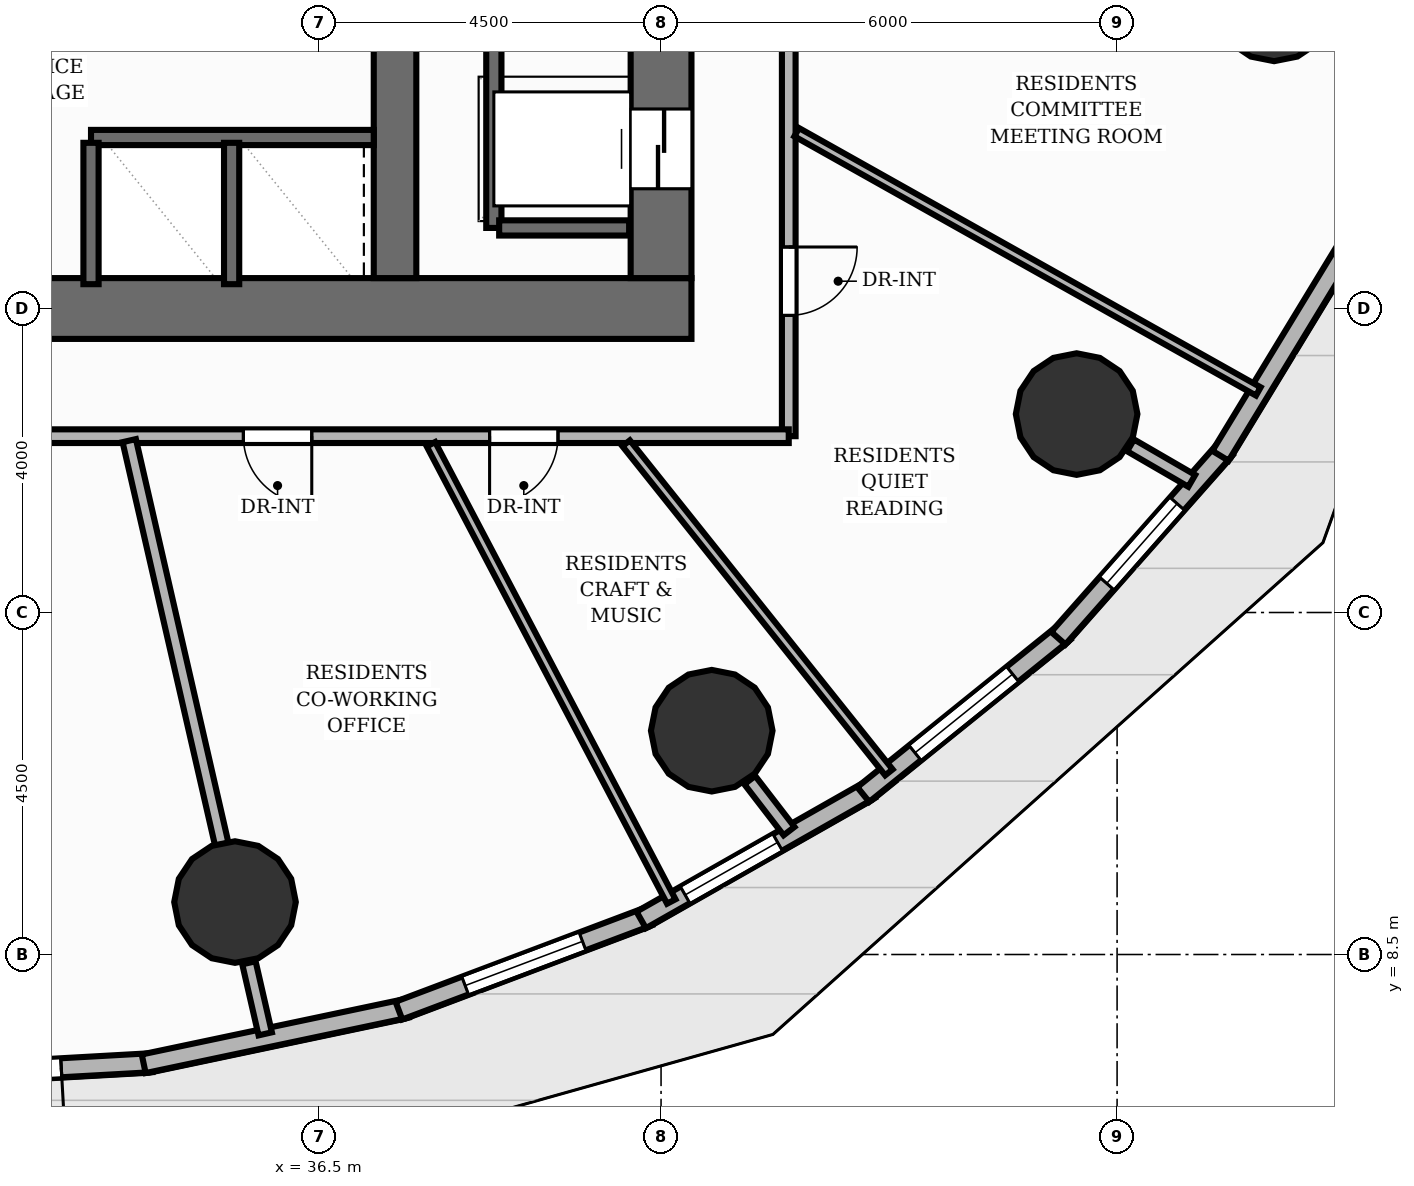
"""IFC4 building model, lengths in metres.
Left out: names, types, materials, properties, quantities, classifications, styles, units other than length and angle.
Written with IfcOpenShell. Run it as: python <this file> out.ifc"""

import sys

from ifc_helpers import new_model, si_unit, direction, frame, frame_2d, origin, origin_2d, place, context, subcontext, project, spatial, rectangle, circle, extrude, element, fill, save


model = new_model("IFC4")
c1 = context("Model", 3, precision=1e-05, world=origin(), true_north=direction((0.0, 1.0)))
c2 = subcontext(c1, "Body", "Model", "MODEL_VIEW")
j1 = project(units=[si_unit("LENGTHUNIT", "METRE"), si_unit("PLANEANGLEUNIT", "RADIAN")], contexts=[c1])
p1 = place(None, origin())
s1 = spatial("IfcSite", under=j1, at=p1, CompositionType="ELEMENT")
p2 = place(p1, origin())
s2 = spatial("IfcBuilding", under=s1, at=p2, CompositionType="ELEMENT")
p3 = place(p2, frame((0.0, 0.0, 34.4)))
s3 = spatial("IfcBuildingStorey", under=s2, at=p3, CompositionType="ELEMENT", Elevation=34.4)
p4 = place(p3, frame((22.6, 17.0, 0.0), z_axis=(0.0, 0.0, 1.0), x_axis=(1.0, 0.0, 0.0)))
e1 = element("IfcWall", 1, at=p4, inside=s3, PredefinedType="SHEAR", context=c2, shape_type="SweptSolid", body=[
    extrude(rectangle(XDim=18.8, YDim=0.8, at=frame_2d((9.4, 0.0))), origin(), (0.0, 0.0, 1.0), 3.2),
])
p5 = place(p4, frame((5.9, 0.0, 0.0)))
e2 = element("IfcOpeningElement", 2, at=p5, cuts=e1, PredefinedType="OPENING", context=c2, shape_type="SweptSolid", body=[
    extrude(rectangle(XDim=1.1, YDim=2.15, at=frame_2d((0.55, 1.075))), frame((0.0, 0.41, 0.0), z_axis=(0.0, -1.0, 0.0), x_axis=(1.0, 0.0, 0.0)), (0.0, 0.0, 1.0), 0.82),
])
p6 = place(p4, frame((9.45, 0.0, 0.0)))
e3 = element("IfcOpeningElement", 3, at=p6, cuts=e1, PredefinedType="OPENING", context=c2, shape_type="SweptSolid", body=[
    extrude(rectangle(XDim=0.9, YDim=2.1, at=frame_2d((0.45, 1.05))), frame((0.0, 0.41, 0.0), z_axis=(0.0, -1.0, 0.0), x_axis=(1.0, 0.0, 0.0)), (0.0, 0.0, 1.0), 0.82),
])
p7 = place(p3, frame((41.0, 17.4, 0.0), z_axis=(0.0, 0.0, 1.0), x_axis=(0.0, 1.0, 0.0)))
e4 = element("IfcWall", 4, at=p7, inside=s3, PredefinedType="SHEAR", context=c2, shape_type="SweptSolid", body=[
    extrude(rectangle(XDim=13.2, YDim=0.8, at=frame_2d((6.6, 0.0))), origin(), (0.0, 0.0, 1.0), 3.2),
])
p8 = place(p7, frame((1.175, 0.0, 0.0)))
e5 = element("IfcOpeningElement", 5, at=p8, cuts=e4, PredefinedType="OPENING", context=c2, shape_type="SweptSolid", body=[
    extrude(rectangle(XDim=1.05, YDim=2.15, at=frame_2d((0.525, 1.075))), frame((0.0, 0.41, 0.0), z_axis=(0.0, -1.0, 0.0), x_axis=(1.0, 0.0, 0.0)), (0.0, 0.0, 1.0), 0.82),
])
p9 = place(p7, frame((4.425, 0.0, 0.0)))
e6 = element("IfcOpeningElement", 6, at=p9, cuts=e4, PredefinedType="OPENING", context=c2, shape_type="SweptSolid", body=[
    extrude(rectangle(XDim=1.05, YDim=2.15, at=frame_2d((0.525, 1.075))), frame((0.0, 0.41, 0.0), z_axis=(0.0, -1.0, 0.0), x_axis=(1.0, 0.0, 0.0)), (0.0, 0.0, 1.0), 0.82),
])
p10 = place(p7, frame((7.725, 0.0, 0.0)))
e7 = element("IfcOpeningElement", 7, at=p10, cuts=e4, PredefinedType="OPENING", context=c2, shape_type="SweptSolid", body=[
    extrude(rectangle(XDim=1.05, YDim=2.15, at=frame_2d((0.525, 1.075))), frame((0.0, 0.41, 0.0), z_axis=(0.0, -1.0, 0.0), x_axis=(1.0, 0.0, 0.0)), (0.0, 0.0, 1.0), 0.82),
])
p11 = place(p7, frame((10.975, 0.0, 0.0)))
e8 = element("IfcOpeningElement", 8, at=p11, cuts=e4, PredefinedType="OPENING", context=c2, shape_type="SweptSolid", body=[
    extrude(rectangle(XDim=1.05, YDim=2.15, at=frame_2d((0.525, 1.075))), frame((0.0, 0.41, 0.0), z_axis=(0.0, -1.0, 0.0), x_axis=(1.0, 0.0, 0.0)), (0.0, 0.0, 1.0), 0.82),
])
p12 = place(p3, frame((37.5, 17.4, 0.0), z_axis=(0.0, 0.0, 1.0), x_axis=(0.0, 1.0, 0.0)))
e9 = element("IfcWall", 9, at=p12, inside=s3, PredefinedType="SHEAR", context=c2, shape_type="SweptSolid", body=[
    extrude(rectangle(XDim=13.2, YDim=0.56, at=frame_2d((6.6, 0.0))), origin(), (0.0, 0.0, 1.0), 3.2),
])
for number, where, z_axis, x_axis in (
    (10, (35.395, 9.19, 0.0), (0.0, 0.0, 1.0), (1.0, 0.0, 0.0)),
    (11, (41.667, 11.445, 0.0), (0.0, 0.0, 1.0), (1.0, 0.0, 0.0)),
    (12, (46.468, 15.611, 0.0), (0.0, 0.0, 1.0), (1.0, 0.0, 0.0)),
    (13, (49.066, 21.054, 0.0), (0.0, 0.0, 1.0), (1.0, 0.0, 0.0)),
):
    element("IfcColumn", number, at=place(p3, frame(where, z_axis=z_axis, x_axis=x_axis)), inside=s3, PredefinedType="COLUMN", context=c2, shape_type="SweptSolid", body=[
        extrude(circle(Radius=0.8, at=origin_2d()), origin(), (0.0, 0.0, 1.0), 3.2),
    ])
p13 = place(p3, frame((34.301, 7.077, 0.0), z_axis=(0.0, 0.0, 1.0), x_axis=(-0.998425121055, -0.056100602904, 0.0)))
e14 = element("IfcWall", 14, at=p13, inside=s3, PredefinedType="SOLIDWALL", context=c2, shape_type="SweptSolid", body=[
    extrude(rectangle(XDim=3.538, YDim=0.25, at=frame_2d((1.769, 0.0))), origin(), (0.0, 0.0, 1.0), 2.96),
])
p14 = place(p13, frame((1.194, 0.0, 0.0)))
e15 = element("IfcOpeningElement", 15, at=p14, cuts=e14, PredefinedType="OPENING", context=c2, shape_type="SweptSolid", body=[
    extrude(rectangle(XDim=1.15, YDim=2.2, at=frame_2d((0.575, 1.1))), frame((0.0, 0.135, 0.0), z_axis=(0.0, -1.0, 0.0), x_axis=(1.0, 0.0, 0.0)), (0.0, 0.0, 1.0), 0.27),
])
p15 = place(p3, frame((37.655, 7.792, 0.0), z_axis=(0.0, 0.0, 1.0), x_axis=(-0.978483842038, -0.206323461756, 0.0)))
e16 = element("IfcWall", 16, at=p15, inside=s3, PredefinedType="SOLIDWALL", context=c2, shape_type="SweptSolid", body=[
    extrude(rectangle(XDim=3.538, YDim=0.25, at=frame_2d((1.769, 0.0))), origin(), (0.0, 0.0, 1.0), 2.96),
])
p16 = place(p3, frame((40.838, 9.001, 0.0), z_axis=(0.0, 0.0, 1.0), x_axis=(-0.935679231508, -0.352851775857, 0.0)))
e17 = element("IfcWall", 17, at=p16, inside=s3, PredefinedType="SOLIDWALL", context=c2, shape_type="SweptSolid", body=[
    extrude(rectangle(XDim=3.513, YDim=0.25, at=frame_2d((1.756, 0.0))), origin(), (0.0, 0.0, 1.0), 2.96),
])
p17 = place(p16, frame((0.931, 0.0, 0.85)))
e18 = element("IfcOpeningElement", 18, at=p17, cuts=e17, PredefinedType="OPENING", context=c2, shape_type="SweptSolid", body=[
    extrude(rectangle(XDim=1.65, YDim=1.55, at=frame_2d((0.825, 0.775))), frame((0.0, 0.135, 0.0), z_axis=(0.0, -1.0, 0.0), x_axis=(1.0, 0.0, 0.0)), (0.0, 0.0, 1.0), 0.27),
])
p18 = place(p3, frame((43.751, 10.667, 0.0), z_axis=(0.0, 0.0, 1.0), x_axis=(-0.869389832426, -0.494126825091, 0.0)))
e19 = element("IfcWall", 19, at=p18, inside=s3, PredefinedType="SOLIDWALL", context=c2, shape_type="SweptSolid", body=[
    extrude(rectangle(XDim=3.465, YDim=0.25, at=frame_2d((1.732, 0.0))), origin(), (0.0, 0.0, 1.0), 2.96),
])
p19 = place(p18, frame((1.4, 0.0, 0.85)))
e20 = element("IfcOpeningElement", 20, at=p19, cuts=e19, PredefinedType="OPENING", context=c2, shape_type="SweptSolid", body=[
    extrude(rectangle(XDim=1.4, YDim=1.29, at=frame_2d((0.7, 0.645))), frame((0.0, 0.135, 0.0), z_axis=(0.0, -1.0, 0.0), x_axis=(1.0, 0.0, 0.0)), (0.0, 0.0, 1.0), 0.27),
])
p20 = place(p3, frame((46.307, 12.739, 0.0), z_axis=(0.0, 0.0, 1.0), x_axis=(-0.778586232895, -0.627537630701, 0.0)))
e21 = element("IfcWall", 21, at=p20, inside=s3, PredefinedType="SOLIDWALL", context=c2, shape_type="SweptSolid", body=[
    extrude(rectangle(XDim=3.399, YDim=0.25, at=frame_2d((1.7, 0.0))), origin(), (0.0, 0.0, 1.0), 2.96),
])
p21 = place(p20, frame((0.875, 0.0, 0.85)))
e22 = element("IfcOpeningElement", 22, at=p21, cuts=e21, PredefinedType="OPENING", context=c2, shape_type="SweptSolid", body=[
    extrude(rectangle(XDim=1.65, YDim=1.55, at=frame_2d((0.825, 0.775))), frame((0.0, 0.135, 0.0), z_axis=(0.0, -1.0, 0.0), x_axis=(1.0, 0.0, 0.0)), (0.0, 0.0, 1.0), 0.27),
])
p22 = place(p3, frame((48.427, 15.152, 0.0), z_axis=(0.0, 0.0, 1.0), x_axis=(-0.662112398544, -0.749404544751, 0.0)))
e23 = element("IfcWall", 23, at=p22, inside=s3, PredefinedType="SOLIDWALL", context=c2, shape_type="SweptSolid", body=[
    extrude(rectangle(XDim=3.323, YDim=0.25, at=frame_2d((1.661, 0.0))), origin(), (0.0, 0.0, 1.0), 2.96),
])
p23 = place(p22, frame((0.961, 0.0, 0.85)))
e24 = element("IfcOpeningElement", 24, at=p23, cuts=e23, PredefinedType="OPENING", context=c2, shape_type="SweptSolid", body=[
    extrude(rectangle(XDim=1.4, YDim=1.55, at=frame_2d((0.7, 0.775))), frame((0.0, 0.135, 0.0), z_axis=(0.0, -1.0, 0.0), x_axis=(1.0, 0.0, 0.0)), (0.0, 0.0, 1.0), 0.27),
])
p24 = place(p3, frame((50.046, 17.834, 0.0), z_axis=(0.0, 0.0, 1.0), x_axis=(-0.519753566346, -0.854316235519, 0.0)))
e25 = element("IfcWall", 25, at=p24, inside=s3, PredefinedType="SOLIDWALL", context=c2, shape_type="SweptSolid", body=[
    extrude(rectangle(XDim=3.244, YDim=0.25, at=frame_2d((1.622, 0.0))), origin(), (0.0, 0.0, 1.0), 2.96),
])
p25 = place(p3, frame((38.8, 18.06, 0.0), z_axis=(0.0, 0.0, 1.0), x_axis=(0.0, 1.0, 0.0)))
e26 = element("IfcWall", 26, at=p25, inside=s3, PredefinedType="SHEAR", context=c2, shape_type="SweptSolid", body=[
    extrude(rectangle(XDim=11.88, YDim=0.2, at=frame_2d((5.94, 0.0))), origin(), (0.0, 0.0, 1.0), 3.2),
])
p26 = place(p3, frame((38.87, 18.06, 0.0), z_axis=(0.0, 0.0, 1.0), x_axis=(1.0, 0.0, 0.0)))
e27 = element("IfcWall", 27, at=p26, inside=s3, PredefinedType="SHEAR", context=c2, shape_type="SweptSolid", body=[
    extrude(rectangle(XDim=1.71, YDim=0.2, at=frame_2d((0.855, 0.0))), origin(), (0.0, 0.0, 1.0), 3.2),
])
p27 = place(p3, frame((33.5, 19.25, 0.0), z_axis=(0.0, 0.0, 1.0), x_axis=(1.0, 0.0, 0.0)))
e28 = element("IfcWall", 28, at=p27, inside=s3, PredefinedType="SHEAR", context=c2, shape_type="SweptSolid", body=[
    extrude(rectangle(XDim=3.72, YDim=0.2, at=frame_2d((1.86, 0.0))), origin(), (0.0, 0.0, 1.0), 3.2),
])
for number, where, z_axis, x_axis in (
    (29, (33.5, 17.32, 0.0), (0.0, 0.0, 1.0), (0.0, 1.0, 0.0)),
    (30, (35.35, 17.32, 0.0), (0.0, 0.0, 1.0), (0.0, 1.0, 0.0)),
):
    element("IfcWall", number, at=place(p3, frame(where, z_axis=z_axis, x_axis=x_axis)), inside=s3, PredefinedType="SHEAR", context=c2, shape_type="SweptSolid", body=[
        extrude(rectangle(XDim=1.86, YDim=0.2, at=frame_2d((0.93, 0.0))), origin(), (0.0, 0.0, 1.0), 3.2),
    ])
p28 = place(p3, frame((35.578, 8.391, 0.0), z_axis=(0.0, 0.0, 1.0), x_axis=(0.223204870581, -0.974771555673, 0.0)))
e31 = element("IfcWall", 31, at=p28, inside=s3, PredefinedType="PARTITIONING", context=c2, shape_type="SweptSolid", body=[
    extrude(rectangle(XDim=0.959, YDim=0.18, at=frame_2d((0.479, 0.0))), origin(), (0.0, 0.0, 1.0), 2.178),
])
p29 = place(p3, frame((42.167, 10.795, 0.0), z_axis=(0.0, 0.0, 1.0), x_axis=(0.609822176225, -0.792538272504, 0.0)))
e32 = element("IfcWall", 32, at=p29, inside=s3, PredefinedType="PARTITIONING", context=c2, shape_type="SweptSolid", body=[
    extrude(rectangle(XDim=0.847, YDim=0.18, at=frame_2d((0.424, 0.0))), origin(), (0.0, 0.0, 1.0), 2.178),
])
p30 = place(p3, frame((47.177, 15.2, 0.0), z_axis=(0.0, 0.0, 1.0), x_axis=(0.864965183009, -0.501831876411, 0.0)))
e33 = element("IfcWall", 33, at=p30, inside=s3, PredefinedType="PARTITIONING", context=c2, shape_type="SweptSolid", body=[
    extrude(rectangle(XDim=0.931, YDim=0.18, at=frame_2d((0.466, 0.0))), origin(), (0.0, 0.0, 1.0), 2.178),
])
p31 = place(p3, frame((42.68, 22.656, 0.0), z_axis=(0.0, 0.0, 1.0), x_axis=(0.0, -1.0, 0.0)))
e34 = element("IfcWall", 34, at=p31, inside=s3, PredefinedType="PARTITIONING", context=c2, shape_type="SweptSolid", body=[
    extrude(rectangle(XDim=7.335, YDim=0.18, at=frame_2d((3.668, 0.0))), origin(), (0.0, 0.0, 1.0), 2.955),
])
p32 = place(p31, frame((1.2, 0.0, 0.0)))
e35 = element("IfcOpeningElement", 35, at=p32, cuts=e34, PredefinedType="OPENING", context=c2, shape_type="SweptSolid", body=[
    extrude(rectangle(XDim=0.9, YDim=2.1, at=frame_2d((0.45, 1.05))), frame((0.0, 0.1, 0.0), z_axis=(0.0, -1.0, 0.0), x_axis=(1.0, 0.0, 0.0)), (0.0, 0.0, 1.0), 0.2),
])
p33 = place(p31, frame((4.846, 0.0, 0.0)))
e36 = element("IfcOpeningElement", 36, at=p33, cuts=e34, PredefinedType="OPENING", context=c2, shape_type="SweptSolid", body=[
    extrude(rectangle(XDim=0.9, YDim=2.1, at=frame_2d((0.45, 1.05))), frame((0.0, 0.1, 0.0), z_axis=(0.0, -1.0, 0.0), x_axis=(1.0, 0.0, 0.0)), (0.0, 0.0, 1.0), 0.2),
])
p34 = place(p3, frame((42.68, 15.32, 0.0), z_axis=(0.0, 0.0, 1.0), x_axis=(-1.0, 0.0, 0.0)))
e37 = element("IfcWall", 37, at=p34, inside=s3, PredefinedType="PARTITIONING", context=c2, shape_type="SweptSolid", body=[
    extrude(rectangle(XDim=21.36, YDim=0.18, at=frame_2d((10.68, 0.0))), origin(), (0.0, 0.0, 1.0), 2.955),
])
p35 = place(p34, frame((3.036, 0.0, 0.0)))
e38 = element("IfcOpeningElement", 38, at=p35, cuts=e37, PredefinedType="OPENING", context=c2, shape_type="SweptSolid", body=[
    extrude(rectangle(XDim=0.9, YDim=2.1, at=frame_2d((0.45, 1.05))), frame((0.0, 0.1, 0.0), z_axis=(0.0, -1.0, 0.0), x_axis=(1.0, 0.0, 0.0)), (0.0, 0.0, 1.0), 0.2),
])
p36 = place(p34, frame((6.275, 0.0, 0.0)))
e39 = element("IfcOpeningElement", 39, at=p36, cuts=e37, PredefinedType="OPENING", context=c2, shape_type="SweptSolid", body=[
    extrude(rectangle(XDim=0.9, YDim=2.1, at=frame_2d((0.45, 1.05))), frame((0.0, 0.1, 0.0), z_axis=(0.0, -1.0, 0.0), x_axis=(1.0, 0.0, 0.0)), (0.0, 0.0, 1.0), 0.2),
])
p37 = place(p34, frame((14.49, 0.0, 0.0)))
e40 = element("IfcOpeningElement", 40, at=p37, cuts=e37, PredefinedType="OPENING", context=c2, shape_type="SweptSolid", body=[
    extrude(rectangle(XDim=1.05, YDim=2.15, at=frame_2d((0.525, 1.075))), frame((0.0, 0.1, 0.0), z_axis=(0.0, -1.0, 0.0), x_axis=(1.0, 0.0, 0.0)), (0.0, 0.0, 1.0), 0.2),
])
p38 = place(p3, frame((48.858, 15.909, 0.0), z_axis=(0.0, 0.0, 1.0), x_axis=(-0.871931019114, 0.489628734764, 0.0)))
e41 = element("IfcWall", 41, at=p38, inside=s3, PredefinedType="PARTITIONING", context=c2, shape_type="SweptSolid", body=[
    extrude(rectangle(XDim=6.965, YDim=0.125, at=frame_2d((3.483, 0.0))), origin(), (0.0, 0.0, 1.0), 2.642),
])
p39 = place(p3, frame((43.998, 10.897, 0.0), z_axis=(0.0, 0.0, 1.0), x_axis=(-0.623937025269, 0.781474624347, 0.0)))
e42 = element("IfcWall", 42, at=p39, inside=s3, PredefinedType="PARTITIONING", context=c2, shape_type="SweptSolid", body=[
    extrude(rectangle(XDim=5.54, YDim=0.125, at=frame_2d((2.77, 0.0))), origin(), (0.0, 0.0, 1.0), 2.955),
])
p40 = place(p3, frame((41.135, 9.197, 0.0), z_axis=(0.0, 0.0, 1.0), x_axis=(-0.465197105493, 0.885207124373, 0.0)))
e43 = element("IfcWall", 43, at=p40, inside=s3, PredefinedType="PARTITIONING", context=c2, shape_type="SweptSolid", body=[
    extrude(rectangle(XDim=6.797, YDim=0.125, at=frame_2d((3.398, 0.0))), origin(), (0.0, 0.0, 1.0), 2.955),
])
p41 = place(p3, frame((35.221, 9.948, 0.0), z_axis=(0.0, 0.0, 1.0), x_axis=(-0.223436436687, 0.974718502318, 0.0)))
e44 = element("IfcWall", 44, at=p41, inside=s3, PredefinedType="PARTITIONING", context=c2, shape_type="SweptSolid", body=[
    extrude(rectangle(XDim=5.451, YDim=0.18, at=frame_2d((2.726, 0.0))), origin(), (0.0, 0.0, 1.0), 2.178),
])
p42 = place(p14, origin())
e45 = element("IfcDoor", 45, at=p42, inside=s3, OperationType="SINGLE_SWING_LEFT", PredefinedType="DOOR", context=c2, shape_type="SweptSolid", body=[
    extrude(rectangle(XDim=1.15, YDim=2.2, at=frame_2d((0.575, 1.1))), frame((0.0, 0.025, 0.0), z_axis=(0.0, -1.0, 0.0), x_axis=(1.0, 0.0, 0.0)), (0.0, 0.0, 1.0), 0.05),
])
fill(e15, e45)
p43 = place(p17, origin())
e46 = element("IfcWindow", 46, at=p43, inside=s3, PartitioningType="SINGLE_PANEL", PredefinedType="WINDOW", context=c2, shape_type="SweptSolid", body=[
    extrude(rectangle(XDim=1.65, YDim=1.55, at=frame_2d((0.825, 0.775))), frame((0.0, 0.03, 0.0), z_axis=(0.0, -1.0, 0.0), x_axis=(1.0, 0.0, 0.0)), (0.0, 0.0, 1.0), 0.06),
])
fill(e18, e46)
p44 = place(p19, origin())
e47 = element("IfcWindow", 47, at=p44, inside=s3, PartitioningType="SINGLE_PANEL", PredefinedType="WINDOW", context=c2, shape_type="SweptSolid", body=[
    extrude(rectangle(XDim=1.4, YDim=1.29, at=frame_2d((0.7, 0.645))), frame((0.0, 0.03, 0.0), z_axis=(0.0, -1.0, 0.0), x_axis=(1.0, 0.0, 0.0)), (0.0, 0.0, 1.0), 0.06),
])
fill(e20, e47)
p45 = place(p21, origin())
e48 = element("IfcWindow", 48, at=p45, inside=s3, PartitioningType="SINGLE_PANEL", PredefinedType="WINDOW", context=c2, shape_type="SweptSolid", body=[
    extrude(rectangle(XDim=1.65, YDim=1.55, at=frame_2d((0.825, 0.775))), frame((0.0, 0.03, 0.0), z_axis=(0.0, -1.0, 0.0), x_axis=(1.0, 0.0, 0.0)), (0.0, 0.0, 1.0), 0.06),
])
fill(e22, e48)
p46 = place(p23, origin())
e49 = element("IfcWindow", 49, at=p46, inside=s3, PartitioningType="SINGLE_PANEL", PredefinedType="WINDOW", context=c2, shape_type="SweptSolid", body=[
    extrude(rectangle(XDim=1.4, YDim=1.55, at=frame_2d((0.7, 0.775))), frame((0.0, 0.03, 0.0), z_axis=(0.0, -1.0, 0.0), x_axis=(1.0, 0.0, 0.0)), (0.0, 0.0, 1.0), 0.06),
])
fill(e24, e49)
p47 = place(p8, origin())
e50 = element("IfcDoor", 50, at=p47, inside=s3, OperationType="DOUBLE_DOOR_SLIDING", PredefinedType="DOOR", context=c2, shape_type="SweptSolid", body=[
    extrude(rectangle(XDim=1.05, YDim=2.15, at=frame_2d((0.525, 1.075))), frame((0.0, 0.025, 0.0), z_axis=(0.0, -1.0, 0.0), x_axis=(1.0, 0.0, 0.0)), (0.0, 0.0, 1.0), 0.05),
])
fill(e5, e50)
p48 = place(p33, origin())
e51 = element("IfcDoor", 51, at=p48, inside=s3, OperationType="SINGLE_SWING_LEFT", PredefinedType="DOOR", context=c2, shape_type="SweptSolid", body=[
    extrude(rectangle(XDim=0.9, YDim=2.1, at=frame_2d((0.45, 1.05))), frame((0.0, 0.025, 0.0), z_axis=(0.0, -1.0, 0.0), x_axis=(1.0, 0.0, 0.0)), (0.0, 0.0, 1.0), 0.05),
])
fill(e36, e51)
p49 = place(p35, origin())
e52 = element("IfcDoor", 52, at=p49, inside=s3, OperationType="SINGLE_SWING_RIGHT", PredefinedType="DOOR", context=c2, shape_type="SweptSolid", body=[
    extrude(rectangle(XDim=0.9, YDim=2.1, at=frame_2d((0.45, 1.05))), frame((0.0, 0.025, 0.0), z_axis=(0.0, -1.0, 0.0), x_axis=(1.0, 0.0, 0.0)), (0.0, 0.0, 1.0), 0.05),
])
fill(e38, e52)
p50 = place(p36, origin())
e53 = element("IfcDoor", 53, at=p50, inside=s3, OperationType="SINGLE_SWING_LEFT", PredefinedType="DOOR", context=c2, shape_type="SweptSolid", body=[
    extrude(rectangle(XDim=0.9, YDim=2.1, at=frame_2d((0.45, 1.05))), frame((0.0, 0.025, 0.0), z_axis=(0.0, -1.0, 0.0), x_axis=(1.0, 0.0, 0.0)), (0.0, 0.0, 1.0), 0.05),
])
fill(e39, e53)
save(model, sys.argv[1])
